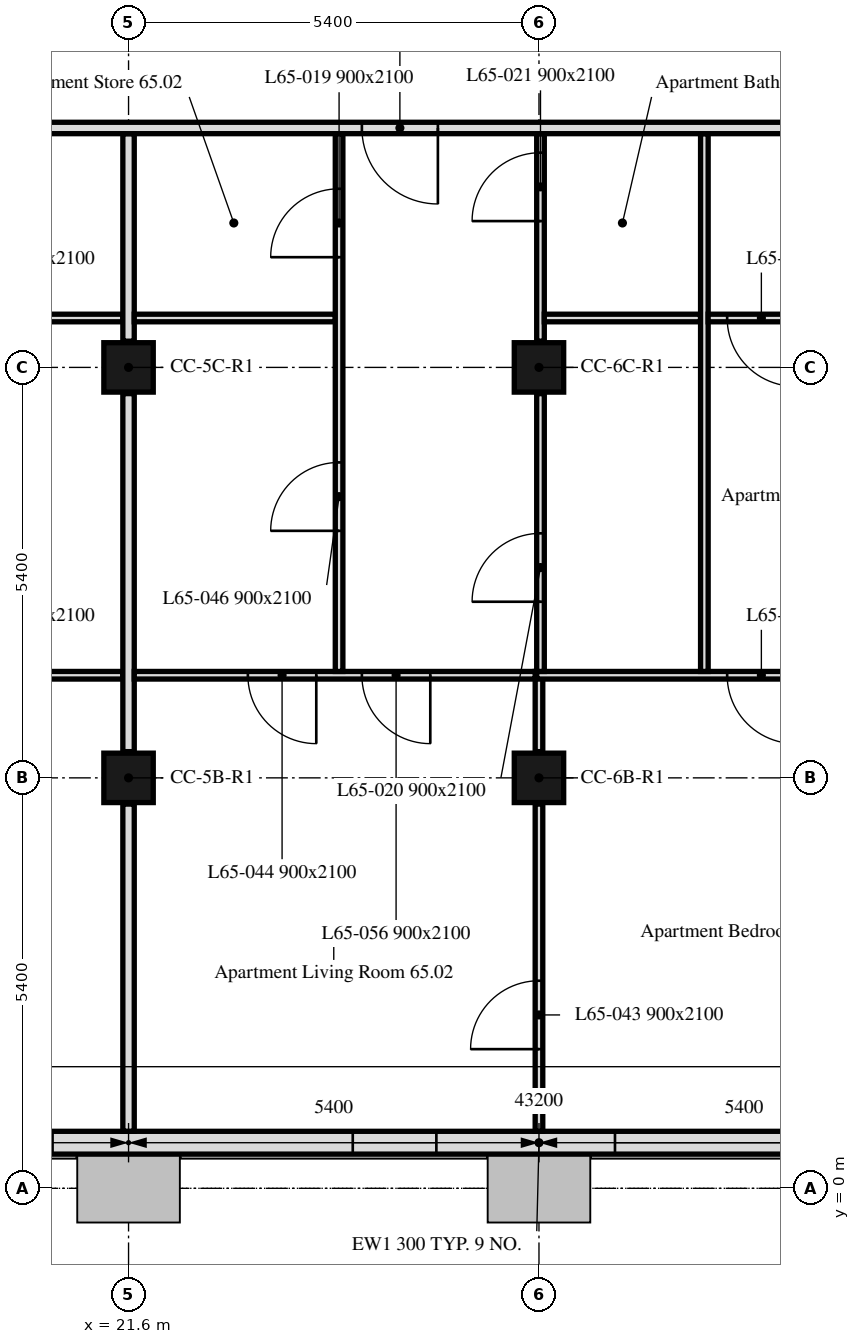
"""IFC4 building model, lengths in metres.
Left out: names, types, materials, properties, quantities, classifications, styles, units other than length and angle.
Written with IfcOpenShell. Run it as: python <this file> out.ifc"""

import sys

from ifc_helpers import new_model, si_unit, direction, frame, frame_2d, origin, origin_2d, place, context, subcontext, project, spatial, rectangle, extrude, element, fill, save


model = new_model("IFC4")
c1 = context("Model", 3, precision=1e-05, world=origin(), true_north=direction((0.0, 1.0)))
c2 = subcontext(c1, "Body", "Model", "MODEL_VIEW")
j1 = project(units=[si_unit("LENGTHUNIT", "METRE"), si_unit("PLANEANGLEUNIT", "RADIAN")], contexts=[c1])
p1 = place(None, origin())
s1 = spatial("IfcSite", under=j1, at=p1, CompositionType="ELEMENT")
p2 = place(p1, origin())
s2 = spatial("IfcBuilding", under=s1, at=p2, CompositionType="ELEMENT")
p3 = place(p2, frame((0.0, 0.0, 268.6)))
s3 = spatial("IfcBuildingStorey", under=s2, at=p3, CompositionType="ELEMENT", Elevation=268.6)
for number, where, z_axis, x_axis in (
    (1, (21.6, 5.4, 0.0), (0.0, 0.0, 1.0), (1.0, 0.0, 0.0)),
    (2, (27.0, 5.4, 0.0), (0.0, 0.0, 1.0), (1.0, 0.0, 0.0)),
    (3, (21.6, 10.8, 0.0), (0.0, 0.0, 1.0), (1.0, 0.0, 0.0)),
    (4, (27.0, 10.8, 0.0), (0.0, 0.0, 1.0), (1.0, 0.0, 0.0)),
):
    element("IfcColumn", number, at=place(p3, frame(where, z_axis=z_axis, x_axis=x_axis)), inside=s3, PredefinedType="COLUMN", context=c2, shape_type="SweptSolid", body=[
        extrude(rectangle(XDim=0.65, YDim=0.65, at=origin_2d()), origin(), (0.0, 0.0, 1.0), 3.0),
    ])
p4 = place(p3, frame((10.986, 0.6, 0.0), z_axis=(0.0, 0.0, 1.0), x_axis=(1.0, 0.0, 0.0)))
e5 = element("IfcWall", 5, at=p4, inside=s3, PredefinedType="SOLIDWALL", context=c2, shape_type="SweptSolid", body=[
    extrude(rectangle(XDim=32.027, YDim=0.3, at=frame_2d((16.014, 0.0))), origin(), (0.0, 0.0, 1.0), 3.0),
])
p5 = place(p4, frame((2.764, 0.0, 0.9)))
e6 = element("IfcOpeningElement", 6, at=p5, cuts=e5, PredefinedType="OPENING", context=c2, shape_type="SweptSolid", body=[
    extrude(rectangle(XDim=1.1, YDim=1.7, at=frame_2d((0.55, 0.85))), frame((0.0, 0.16, 0.0), z_axis=(0.0, -1.0, 0.0), x_axis=(1.0, 0.0, 0.0)), (0.0, 0.0, 1.0), 0.32),
])
p6 = place(p4, frame((6.214, 0.0, 0.9)))
e7 = element("IfcOpeningElement", 7, at=p6, cuts=e5, PredefinedType="OPENING", context=c2, shape_type="SweptSolid", body=[
    extrude(rectangle(XDim=3.4, YDim=1.7, at=frame_2d((1.7, 0.85))), frame((0.0, 0.16, 0.0), z_axis=(0.0, -1.0, 0.0), x_axis=(1.0, 0.0, 0.0)), (0.0, 0.0, 1.0), 0.32),
])
p7 = place(p4, frame((13.564, 0.0, 0.9)))
e8 = element("IfcOpeningElement", 8, at=p7, cuts=e5, PredefinedType="OPENING", context=c2, shape_type="SweptSolid", body=[
    extrude(rectangle(XDim=1.1, YDim=1.7, at=frame_2d((0.55, 0.85))), frame((0.0, 0.16, 0.0), z_axis=(0.0, -1.0, 0.0), x_axis=(1.0, 0.0, 0.0)), (0.0, 0.0, 1.0), 0.32),
])
p8 = place(p4, frame((17.014, 0.0, 0.9)))
e9 = element("IfcOpeningElement", 9, at=p8, cuts=e5, PredefinedType="OPENING", context=c2, shape_type="SweptSolid", body=[
    extrude(rectangle(XDim=3.4, YDim=1.7, at=frame_2d((1.7, 0.85))), frame((0.0, 0.16, 0.0), z_axis=(0.0, -1.0, 0.0), x_axis=(1.0, 0.0, 0.0)), (0.0, 0.0, 1.0), 0.32),
])
p9 = place(p4, frame((24.364, 0.0, 0.9)))
e10 = element("IfcOpeningElement", 10, at=p9, cuts=e5, PredefinedType="OPENING", context=c2, shape_type="SweptSolid", body=[
    extrude(rectangle(XDim=1.1, YDim=1.7, at=frame_2d((0.55, 0.85))), frame((0.0, 0.16, 0.0), z_axis=(0.0, -1.0, 0.0), x_axis=(1.0, 0.0, 0.0)), (0.0, 0.0, 1.0), 0.32),
])
p10 = place(p4, frame((27.814, 0.0, 0.9)))
e11 = element("IfcOpeningElement", 11, at=p10, cuts=e5, PredefinedType="OPENING", context=c2, shape_type="SweptSolid", body=[
    extrude(rectangle(XDim=3.4, YDim=1.7, at=frame_2d((1.7, 0.85))), frame((0.0, 0.16, 0.0), z_axis=(0.0, -1.0, 0.0), x_axis=(1.0, 0.0, 0.0)), (0.0, 0.0, 1.0), 0.32),
])
p11 = place(p3, frame((21.525, 6.75, 0.0), z_axis=(0.0, 0.0, 1.0), x_axis=(-1.0, 0.0, 0.0)))
e12 = element("IfcWall", 12, at=p11, inside=s3, PredefinedType="PARTITIONING", context=c2, shape_type="SweptSolid", body=[
    extrude(rectangle(XDim=10.65, YDim=0.1, at=frame_2d((5.325, 0.0))), origin(), (0.0, 0.0, 1.0), 2.4),
])
p12 = place(p11, frame((8.813, 0.0, 0.0)))
e13 = element("IfcOpeningElement", 13, at=p12, cuts=e12, PredefinedType="OPENING", context=c2, shape_type="SweptSolid", body=[
    extrude(rectangle(XDim=0.9, YDim=2.1, at=frame_2d((0.45, 1.05))), frame((0.0, 0.05, 0.0), z_axis=(0.0, -1.0, 0.0), x_axis=(1.0, 0.0, 0.0)), (0.0, 0.0, 1.0), 0.1),
])
p13 = place(p11, frame((1.675, 0.0, 0.0)))
e14 = element("IfcOpeningElement", 14, at=p13, cuts=e12, PredefinedType="OPENING", context=c2, shape_type="SweptSolid", body=[
    extrude(rectangle(XDim=0.9, YDim=2.1, at=frame_2d((0.45, 1.05))), frame((0.0, 0.05, 0.0), z_axis=(0.0, -1.0, 0.0), x_axis=(1.0, 0.0, 0.0)), (0.0, 0.0, 1.0), 0.1),
])
p14 = place(p11, frame((7.313, 0.0, 0.0)))
e15 = element("IfcOpeningElement", 15, at=p14, cuts=e12, PredefinedType="OPENING", context=c2, shape_type="SweptSolid", body=[
    extrude(rectangle(XDim=0.9, YDim=2.1, at=frame_2d((0.45, 1.05))), frame((0.0, 0.05, 0.0), z_axis=(0.0, -1.0, 0.0), x_axis=(1.0, 0.0, 0.0)), (0.0, 0.0, 1.0), 0.1),
])
p15 = place(p3, frame((21.6, 0.751, 0.0), z_axis=(0.0, 0.0, 1.0), x_axis=(0.0, 1.0, 0.0)))
e16 = element("IfcWall", 16, at=p15, inside=s3, PredefinedType="PARTITIONING", context=c2, shape_type="SweptSolid", body=[
    extrude(rectangle(XDim=4.304, YDim=0.15, at=frame_2d((2.152, 0.0))), origin(), (0.0, 0.0, 1.0), 2.4),
])
p16 = place(p3, frame((21.6, 5.745, 0.0), z_axis=(0.0, 0.0, 1.0), x_axis=(0.0, 1.0, 0.0)))
e17 = element("IfcWall", 17, at=p16, inside=s3, PredefinedType="PARTITIONING", context=c2, shape_type="SweptSolid", body=[
    extrude(rectangle(XDim=4.71, YDim=0.15, at=frame_2d((2.355, 0.0))), origin(), (0.0, 0.0, 1.0), 2.4),
])
p17 = place(p3, frame((21.525, 11.45, 0.0), z_axis=(0.0, 0.0, 1.0), x_axis=(-1.0, 0.0, 0.0)))
e18 = element("IfcWall", 18, at=p17, inside=s3, PredefinedType="PARTITIONING", context=c2, shape_type="SweptSolid", body=[
    extrude(rectangle(XDim=2.825, YDim=0.1, at=frame_2d((1.413, 0.0))), origin(), (0.0, 0.0, 1.0), 3.0),
])
p18 = place(p17, frame((1.675, 0.0, 0.0)))
e19 = element("IfcOpeningElement", 19, at=p18, cuts=e18, PredefinedType="OPENING", context=c2, shape_type="SweptSolid", body=[
    extrude(rectangle(XDim=0.9, YDim=2.1, at=frame_2d((0.45, 1.05))), frame((0.0, 0.05, 0.0), z_axis=(0.0, -1.0, 0.0), x_axis=(1.0, 0.0, 0.0)), (0.0, 0.0, 1.0), 0.1),
])
p19 = place(p3, frame((21.6, 11.145, 0.0), z_axis=(0.0, 0.0, 1.0), x_axis=(0.0, 1.0, 0.0)))
e20 = element("IfcWall", 20, at=p19, inside=s3, PredefinedType="PARTITIONING", context=c2, shape_type="SweptSolid", body=[
    extrude(rectangle(XDim=2.73, YDim=0.15, at=frame_2d((1.365, 0.0))), origin(), (0.0, 0.0, 1.0), 2.4),
])
p20 = place(p3, frame((27.0, 0.751, 0.0), z_axis=(0.0, 0.0, 1.0), x_axis=(0.0, 1.0, 0.0)))
e21 = element("IfcWall", 21, at=p20, inside=s3, PredefinedType="PARTITIONING", context=c2, shape_type="SweptSolid", body=[
    extrude(rectangle(XDim=4.304, YDim=0.1, at=frame_2d((2.152, 0.0))), origin(), (0.0, 0.0, 1.0), 2.4),
])
p21 = place(p20, frame((1.08, 0.0, 0.0)))
e22 = element("IfcOpeningElement", 22, at=p21, cuts=e21, PredefinedType="OPENING", context=c2, shape_type="SweptSolid", body=[
    extrude(rectangle(XDim=0.9, YDim=2.1, at=frame_2d((0.45, 1.05))), frame((0.0, 0.05, 0.0), z_axis=(0.0, -1.0, 0.0), x_axis=(1.0, 0.0, 0.0)), (0.0, 0.0, 1.0), 0.1),
])
p22 = place(p3, frame((27.0, 5.745, 0.0), z_axis=(0.0, 0.0, 1.0), x_axis=(0.0, 1.0, 0.0)))
e23 = element("IfcWall", 23, at=p22, inside=s3, PredefinedType="PARTITIONING", context=c2, shape_type="SweptSolid", body=[
    extrude(rectangle(XDim=1.055, YDim=0.1, at=frame_2d((0.527, 0.0))), origin(), (0.0, 0.0, 1.0), 2.4),
])
p23 = place(p3, frame((26.95, 6.75, 0.0), z_axis=(0.0, 0.0, 1.0), x_axis=(-1.0, 0.0, 0.0)))
e24 = element("IfcWall", 24, at=p23, inside=s3, PredefinedType="PARTITIONING", context=c2, shape_type="SweptSolid", body=[
    extrude(rectangle(XDim=5.275, YDim=0.1, at=frame_2d((2.637, 0.0))), origin(), (0.0, 0.0, 1.0), 3.0),
])
p24 = place(p23, frame((2.88, 0.0, 0.0)))
e25 = element("IfcOpeningElement", 25, at=p24, cuts=e24, PredefinedType="OPENING", context=c2, shape_type="SweptSolid", body=[
    extrude(rectangle(XDim=0.9, YDim=2.1, at=frame_2d((0.45, 1.05))), frame((0.0, 0.05, 0.0), z_axis=(0.0, -1.0, 0.0), x_axis=(1.0, 0.0, 0.0)), (0.0, 0.0, 1.0), 0.1),
])
p25 = place(p23, frame((1.38, 0.0, 0.0)))
e26 = element("IfcOpeningElement", 26, at=p25, cuts=e24, PredefinedType="OPENING", context=c2, shape_type="SweptSolid", body=[
    extrude(rectangle(XDim=0.9, YDim=2.1, at=frame_2d((0.45, 1.05))), frame((0.0, 0.05, 0.0), z_axis=(0.0, -1.0, 0.0), x_axis=(1.0, 0.0, 0.0)), (0.0, 0.0, 1.0), 0.1),
])
p26 = place(p3, frame((32.325, 6.75, 0.0), z_axis=(0.0, 0.0, 1.0), x_axis=(-1.0, 0.0, 0.0)))
e27 = element("IfcWall", 27, at=p26, inside=s3, PredefinedType="PARTITIONING", context=c2, shape_type="SweptSolid", body=[
    extrude(rectangle(XDim=5.355, YDim=0.1, at=frame_2d((2.677, 0.0))), origin(), (0.0, 0.0, 1.0), 3.0),
])
p27 = place(p26, frame((1.949, 0.0, 0.0)))
e28 = element("IfcOpeningElement", 28, at=p27, cuts=e27, PredefinedType="OPENING", context=c2, shape_type="SweptSolid", body=[
    extrude(rectangle(XDim=0.9, YDim=2.1, at=frame_2d((0.45, 1.05))), frame((0.0, 0.05, 0.0), z_axis=(0.0, -1.0, 0.0), x_axis=(1.0, 0.0, 0.0)), (0.0, 0.0, 1.0), 0.1),
])
p28 = place(p3, frame((24.32, 11.45, 0.0), z_axis=(0.0, 0.0, 1.0), x_axis=(-1.0, 0.0, 0.0)))
e29 = element("IfcWall", 29, at=p28, inside=s3, PredefinedType="PARTITIONING", context=c2, shape_type="SweptSolid", body=[
    extrude(rectangle(XDim=2.645, YDim=0.1, at=frame_2d((1.323, 0.0))), origin(), (0.0, 0.0, 1.0), 3.0),
])
p29 = place(p3, frame((24.37, 6.8, 0.0), z_axis=(0.0, 0.0, 1.0), x_axis=(0.0, 1.0, 0.0)))
e30 = element("IfcWall", 30, at=p29, inside=s3, PredefinedType="PARTITIONING", context=c2, shape_type="SweptSolid", body=[
    extrude(rectangle(XDim=7.075, YDim=0.1, at=frame_2d((3.538, 0.0))), origin(), (0.0, 0.0, 1.0), 3.0),
])
p30 = place(p29, frame((5.45, 0.0, 0.0)))
e31 = element("IfcOpeningElement", 31, at=p30, cuts=e30, PredefinedType="OPENING", context=c2, shape_type="SweptSolid", body=[
    extrude(rectangle(XDim=0.9, YDim=2.1, at=frame_2d((0.45, 1.05))), frame((0.0, 0.05, 0.0), z_axis=(0.0, -1.0, 0.0), x_axis=(1.0, 0.0, 0.0)), (0.0, 0.0, 1.0), 0.1),
])
p31 = place(p29, frame((1.85, 0.0, 0.0)))
e32 = element("IfcOpeningElement", 32, at=p31, cuts=e30, PredefinedType="OPENING", context=c2, shape_type="SweptSolid", body=[
    extrude(rectangle(XDim=0.9, YDim=2.1, at=frame_2d((0.45, 1.05))), frame((0.0, 0.05, 0.0), z_axis=(0.0, -1.0, 0.0), x_axis=(1.0, 0.0, 0.0)), (0.0, 0.0, 1.0), 0.1),
])
p32 = place(p3, frame((27.02, 6.8, 0.0), z_axis=(0.0, 0.0, 1.0), x_axis=(0.0, 1.0, 0.0)))
e33 = element("IfcWall", 33, at=p32, inside=s3, PredefinedType="PARTITIONING", context=c2, shape_type="SweptSolid", body=[
    extrude(rectangle(XDim=3.655, YDim=0.1, at=frame_2d((1.828, 0.0))), origin(), (0.0, 0.0, 1.0), 2.4),
])
p33 = place(p32, frame((0.917, 0.0, 0.0)))
e34 = element("IfcOpeningElement", 34, at=p33, cuts=e33, PredefinedType="OPENING", context=c2, shape_type="SweptSolid", body=[
    extrude(rectangle(XDim=0.9, YDim=2.1, at=frame_2d((0.45, 1.05))), frame((0.0, 0.05, 0.0), z_axis=(0.0, -1.0, 0.0), x_axis=(1.0, 0.0, 0.0)), (0.0, 0.0, 1.0), 0.1),
])
p34 = place(p3, frame((27.02, 11.145, 0.0), z_axis=(0.0, 0.0, 1.0), x_axis=(0.0, 1.0, 0.0)))
e35 = element("IfcWall", 35, at=p34, inside=s3, PredefinedType="PARTITIONING", context=c2, shape_type="SweptSolid", body=[
    extrude(rectangle(XDim=2.73, YDim=0.1, at=frame_2d((1.365, 0.0))), origin(), (0.0, 0.0, 1.0), 2.4),
])
p35 = place(p34, frame((1.58, 0.0, 0.0)))
e36 = element("IfcOpeningElement", 36, at=p35, cuts=e35, PredefinedType="OPENING", context=c2, shape_type="SweptSolid", body=[
    extrude(rectangle(XDim=0.9, YDim=2.1, at=frame_2d((0.45, 1.05))), frame((0.0, 0.05, 0.0), z_axis=(0.0, -1.0, 0.0), x_axis=(1.0, 0.0, 0.0)), (0.0, 0.0, 1.0), 0.1),
])
p36 = place(p3, frame((29.126, 11.45, 0.0), z_axis=(0.0, 0.0, 1.0), x_axis=(-1.0, 0.0, 0.0)))
e37 = element("IfcWall", 37, at=p36, inside=s3, PredefinedType="PARTITIONING", context=c2, shape_type="SweptSolid", body=[
    extrude(rectangle(XDim=2.056, YDim=0.1, at=frame_2d((1.028, 0.0))), origin(), (0.0, 0.0, 1.0), 3.0),
])
p37 = place(p3, frame((29.176, 6.8, 0.0), z_axis=(0.0, 0.0, 1.0), x_axis=(0.0, 1.0, 0.0)))
e38 = element("IfcWall", 38, at=p37, inside=s3, PredefinedType="PARTITIONING", context=c2, shape_type="SweptSolid", body=[
    extrude(rectangle(XDim=7.075, YDim=0.1, at=frame_2d((3.538, 0.0))), origin(), (0.0, 0.0, 1.0), 3.0),
])
p38 = place(p3, frame((32.325, 11.45, 0.0), z_axis=(0.0, 0.0, 1.0), x_axis=(-1.0, 0.0, 0.0)))
e39 = element("IfcWall", 39, at=p38, inside=s3, PredefinedType="PARTITIONING", context=c2, shape_type="SweptSolid", body=[
    extrude(rectangle(XDim=3.099, YDim=0.1, at=frame_2d((1.549, 0.0))), origin(), (0.0, 0.0, 1.0), 3.0),
])
p39 = place(p38, frame((1.949, 0.0, 0.0)))
e40 = element("IfcOpeningElement", 40, at=p39, cuts=e39, PredefinedType="OPENING", context=c2, shape_type="SweptSolid", body=[
    extrude(rectangle(XDim=0.9, YDim=2.1, at=frame_2d((0.45, 1.05))), frame((0.0, 0.05, 0.0), z_axis=(0.0, -1.0, 0.0), x_axis=(1.0, 0.0, 0.0)), (0.0, 0.0, 1.0), 0.1),
])
p40 = place(p3, frame((47.849, 13.95, 0.0), z_axis=(0.0, 0.0, 1.0), x_axis=(-1.0, 0.0, 0.0)))
e41 = element("IfcWall", 41, at=p40, inside=s3, PredefinedType="PARTITIONING", context=c2, shape_type="SweptSolid", body=[
    extrude(rectangle(XDim=41.698, YDim=0.15, at=frame_2d((20.849, 0.0))), origin(), (0.0, 0.0, 1.0), 2.4),
])
p41 = place(p40, frame((37.749, 0.0, 0.0)))
e42 = element("IfcOpeningElement", 42, at=p41, cuts=e41, PredefinedType="OPENING", context=c2, shape_type="SweptSolid", body=[
    extrude(rectangle(XDim=1.0, YDim=2.1, at=frame_2d((0.5, 1.05))), frame((0.0, 0.075, 0.0), z_axis=(0.0, -1.0, 0.0), x_axis=(1.0, 0.0, 0.0)), (0.0, 0.0, 1.0), 0.15),
])
p42 = place(p40, frame((32.962, 0.0, 0.0)))
e43 = element("IfcOpeningElement", 43, at=p42, cuts=e41, PredefinedType="OPENING", context=c2, shape_type="SweptSolid", body=[
    extrude(rectangle(XDim=1.0, YDim=2.1, at=frame_2d((0.5, 1.05))), frame((0.0, 0.075, 0.0), z_axis=(0.0, -1.0, 0.0), x_axis=(1.0, 0.0, 0.0)), (0.0, 0.0, 1.0), 0.15),
])
p43 = place(p40, frame((22.179, 0.0, 0.0)))
e44 = element("IfcOpeningElement", 44, at=p43, cuts=e41, PredefinedType="OPENING", context=c2, shape_type="SweptSolid", body=[
    extrude(rectangle(XDim=1.0, YDim=2.1, at=frame_2d((0.5, 1.05))), frame((0.0, 0.075, 0.0), z_axis=(0.0, -1.0, 0.0), x_axis=(1.0, 0.0, 0.0)), (0.0, 0.0, 1.0), 0.15),
])
p44 = place(p40, frame((9.193, 0.0, 0.0)))
e45 = element("IfcOpeningElement", 45, at=p44, cuts=e41, PredefinedType="OPENING", context=c2, shape_type="SweptSolid", body=[
    extrude(rectangle(XDim=1.0, YDim=2.1, at=frame_2d((0.5, 1.05))), frame((0.0, 0.075, 0.0), z_axis=(0.0, -1.0, 0.0), x_axis=(1.0, 0.0, 0.0)), (0.0, 0.0, 1.0), 0.15),
])
p45 = place(p7, origin())
e46 = element("IfcWindow", 46, at=p45, inside=s3, PartitioningType="SINGLE_PANEL", PredefinedType="WINDOW", context=c2, shape_type="SweptSolid", body=[
    extrude(rectangle(XDim=1.1, YDim=1.7, at=frame_2d((0.55, 0.85))), frame((0.0, 0.03, 0.0), z_axis=(0.0, -1.0, 0.0), x_axis=(1.0, 0.0, 0.0)), (0.0, 0.0, 1.0), 0.06),
])
fill(e8, e46)
p46 = place(p8, origin())
e47 = element("IfcWindow", 47, at=p46, inside=s3, PartitioningType="SINGLE_PANEL", PredefinedType="WINDOW", context=c2, shape_type="SweptSolid", body=[
    extrude(rectangle(XDim=3.4, YDim=1.7, at=frame_2d((1.7, 0.85))), frame((0.0, 0.03, 0.0), z_axis=(0.0, -1.0, 0.0), x_axis=(1.0, 0.0, 0.0)), (0.0, 0.0, 1.0), 0.06),
])
fill(e9, e47)
p47 = place(p30, origin())
e48 = element("IfcDoor", 48, at=p47, inside=s3, OperationType="SINGLE_SWING_RIGHT", PredefinedType="DOOR", context=c2, shape_type="SweptSolid", body=[
    extrude(rectangle(XDim=0.9, YDim=2.1, at=frame_2d((0.45, 1.05))), frame((0.0, 0.025, 0.0), z_axis=(0.0, -1.0, 0.0), x_axis=(1.0, 0.0, 0.0)), (0.0, 0.0, 1.0), 0.05),
])
fill(e31, e48)
p48 = place(p33, origin())
e49 = element("IfcDoor", 49, at=p48, inside=s3, OperationType="SINGLE_SWING_LEFT", PredefinedType="DOOR", context=c2, shape_type="SweptSolid", body=[
    extrude(rectangle(XDim=0.9, YDim=2.1, at=frame_2d((0.45, 1.05))), frame((0.0, 0.025, 0.0), z_axis=(0.0, -1.0, 0.0), x_axis=(1.0, 0.0, 0.0)), (0.0, 0.0, 1.0), 0.05),
])
fill(e34, e49)
p49 = place(p35, origin())
e50 = element("IfcDoor", 50, at=p49, inside=s3, OperationType="SINGLE_SWING_LEFT", PredefinedType="DOOR", context=c2, shape_type="SweptSolid", body=[
    extrude(rectangle(XDim=0.9, YDim=2.1, at=frame_2d((0.45, 1.05))), frame((0.0, 0.025, 0.0), z_axis=(0.0, -1.0, 0.0), x_axis=(1.0, 0.0, 0.0)), (0.0, 0.0, 1.0), 0.05),
])
fill(e36, e50)
p50 = place(p39, origin())
e51 = element("IfcDoor", 51, at=p50, inside=s3, OperationType="SINGLE_SWING_LEFT", PredefinedType="DOOR", context=c2, shape_type="SweptSolid", body=[
    extrude(rectangle(XDim=0.9, YDim=2.1, at=frame_2d((0.45, 1.05))), frame((0.0, 0.025, 0.0), z_axis=(0.0, -1.0, 0.0), x_axis=(1.0, 0.0, 0.0)), (0.0, 0.0, 1.0), 0.05),
])
fill(e40, e51)
p51 = place(p21, origin())
e52 = element("IfcDoor", 52, at=p51, inside=s3, OperationType="SINGLE_SWING_LEFT", PredefinedType="DOOR", context=c2, shape_type="SweptSolid", body=[
    extrude(rectangle(XDim=0.9, YDim=2.1, at=frame_2d((0.45, 1.05))), frame((0.0, 0.025, 0.0), z_axis=(0.0, -1.0, 0.0), x_axis=(1.0, 0.0, 0.0)), (0.0, 0.0, 1.0), 0.05),
])
fill(e22, e52)
p52 = place(p24, origin())
e53 = element("IfcDoor", 53, at=p52, inside=s3, OperationType="SINGLE_SWING_LEFT", PredefinedType="DOOR", context=c2, shape_type="SweptSolid", body=[
    extrude(rectangle(XDim=0.9, YDim=2.1, at=frame_2d((0.45, 1.05))), frame((0.0, 0.025, 0.0), z_axis=(0.0, -1.0, 0.0), x_axis=(1.0, 0.0, 0.0)), (0.0, 0.0, 1.0), 0.05),
])
fill(e25, e53)
p53 = place(p27, origin())
e54 = element("IfcDoor", 54, at=p53, inside=s3, OperationType="SINGLE_SWING_RIGHT", PredefinedType="DOOR", context=c2, shape_type="SweptSolid", body=[
    extrude(rectangle(XDim=0.9, YDim=2.1, at=frame_2d((0.45, 1.05))), frame((0.0, 0.025, 0.0), z_axis=(0.0, -1.0, 0.0), x_axis=(1.0, 0.0, 0.0)), (0.0, 0.0, 1.0), 0.05),
])
fill(e28, e54)
p54 = place(p31, origin())
e55 = element("IfcDoor", 55, at=p54, inside=s3, OperationType="SINGLE_SWING_LEFT", PredefinedType="DOOR", context=c2, shape_type="SweptSolid", body=[
    extrude(rectangle(XDim=0.9, YDim=2.1, at=frame_2d((0.45, 1.05))), frame((0.0, 0.025, 0.0), z_axis=(0.0, -1.0, 0.0), x_axis=(1.0, 0.0, 0.0)), (0.0, 0.0, 1.0), 0.05),
])
fill(e32, e55)
p55 = place(p25, origin())
e56 = element("IfcDoor", 56, at=p55, inside=s3, OperationType="SINGLE_SWING_RIGHT", PredefinedType="DOOR", context=c2, shape_type="SweptSolid", body=[
    extrude(rectangle(XDim=0.9, YDim=2.1, at=frame_2d((0.45, 1.05))), frame((0.0, 0.025, 0.0), z_axis=(0.0, -1.0, 0.0), x_axis=(1.0, 0.0, 0.0)), (0.0, 0.0, 1.0), 0.05),
])
fill(e26, e56)
p56 = place(p43, origin())
e57 = element("IfcDoor", 57, at=p56, inside=s3, OperationType="SINGLE_SWING_RIGHT", PredefinedType="DOOR", context=c2, shape_type="SweptSolid", body=[
    extrude(rectangle(XDim=1.0, YDim=2.1, at=frame_2d((0.5, 1.05))), frame((0.0, 0.025, 0.0), z_axis=(0.0, -1.0, 0.0), x_axis=(1.0, 0.0, 0.0)), (0.0, 0.0, 1.0), 0.05),
])
fill(e44, e57)
save(model, sys.argv[1])
